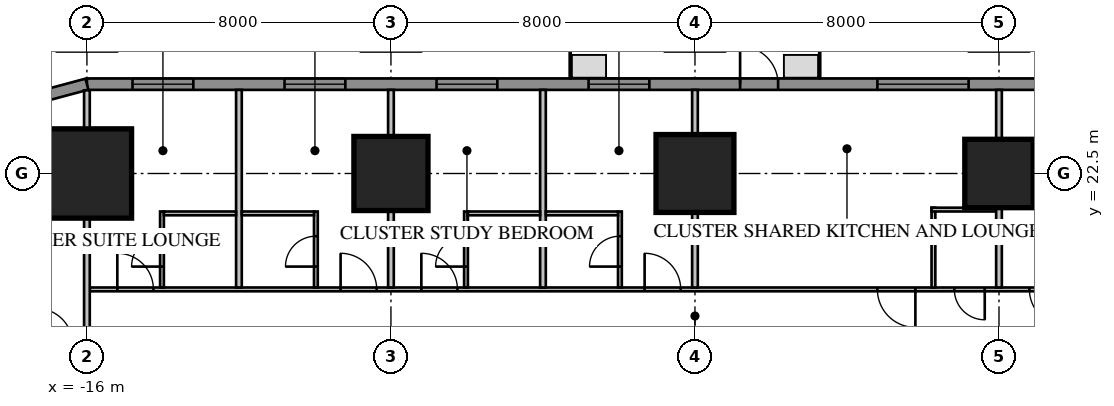
"""IFC4 building model, lengths in metres.
Left out: names, types, materials, properties, quantities, classifications, styles, units other than length and angle.
Written with IfcOpenShell. Run it as: python <this file> out.ifc"""

import sys

from ifc_helpers import new_model, si_unit, direction, frame, frame_2d, origin, origin_2d, place, context, subcontext, project, spatial, rectangle, extrude, element, fill, save


model = new_model("IFC4")
c1 = context("Model", 3, precision=1e-05, world=origin(), true_north=direction((0.0, 1.0)))
c2 = subcontext(c1, "Body", "Model", "MODEL_VIEW")
j1 = project(units=[si_unit("LENGTHUNIT", "METRE"), si_unit("PLANEANGLEUNIT", "RADIAN")], contexts=[c1])
p1 = place(None, origin())
s1 = spatial("IfcSite", under=j1, at=p1, CompositionType="ELEMENT")
p2 = place(p1, origin())
s2 = spatial("IfcBuilding", under=s1, at=p2, CompositionType="ELEMENT")
p3 = place(p2, frame((0.0, 0.0, 31.4)))
s3 = spatial("IfcBuildingStorey", under=s2, at=p3, CompositionType="ELEMENT", Elevation=31.4)
p4 = place(p3, frame((8.0, 22.5, 0.0), z_axis=(0.0, 0.0, 1.0), x_axis=(1.0, 0.0, 0.0)))
e1 = element("IfcColumn", 1, at=p4, inside=s3, PredefinedType="COLUMN", context=c2, shape_type="SweptSolid", body=[
    extrude(rectangle(XDim=1.8, YDim=1.8, at=origin_2d()), origin(), (0.0, 0.0, 1.0), 3.85),
])
p5 = place(p3, frame((0.0, 22.5, 0.0), z_axis=(0.0, 0.0, 1.0), x_axis=(1.0, 0.0, 0.0)))
e2 = element("IfcColumn", 2, at=p5, inside=s3, PredefinedType="COLUMN", context=c2, shape_type="SweptSolid", body=[
    extrude(rectangle(XDim=2.05, YDim=2.05, at=origin_2d()), origin(), (0.0, 0.0, 1.0), 3.85),
])
p6 = place(p3, frame((-8.0, 22.5, 0.0), z_axis=(0.0, 0.0, 1.0), x_axis=(1.0, 0.0, 0.0)))
e3 = element("IfcColumn", 3, at=p6, inside=s3, PredefinedType="COLUMN", context=c2, shape_type="SweptSolid", body=[
    extrude(rectangle(XDim=1.95, YDim=1.95, at=origin_2d()), origin(), (0.0, 0.0, 1.0), 3.85),
])
p7 = place(p3, frame((-16.0, 22.5, 0.0), z_axis=(0.0, 0.0, 1.0), x_axis=(1.0, 0.0, 0.0)))
e4 = element("IfcColumn", 4, at=p7, inside=s3, PredefinedType="COLUMN", context=c2, shape_type="SweptSolid", body=[
    extrude(rectangle(XDim=2.35, YDim=2.35, at=origin_2d()), origin(), (0.0, 0.0, 1.0), 3.85),
])
p8 = place(p3, frame((16.0, 24.85, 0.0), z_axis=(0.0, 0.0, 1.0), x_axis=(-1.0, 0.0, 0.0)))
e5 = element("IfcWall", 5, at=p8, inside=s3, PredefinedType="SOLIDWALL", context=c2, shape_type="SweptSolid", body=[
    extrude(rectangle(XDim=32.0, YDim=0.3, at=frame_2d((16.0, 0.0))), origin(), (0.0, 0.0, 1.0), 3.65),
])
p9 = place(p8, frame((1.2, 0.0, 0.75)))
e6 = element("IfcOpeningElement", 6, at=p9, cuts=e5, PredefinedType="OPENING", context=c2, shape_type="SweptSolid", body=[
    extrude(rectangle(XDim=1.6, YDim=1.8, at=frame_2d((0.8, 0.9))), frame((0.0, 0.17, 0.0), z_axis=(0.0, -1.0, 0.0), x_axis=(1.0, 0.0, 0.0)), (0.0, 0.0, 1.0), 0.34),
])
p10 = place(p8, frame((5.2, 0.0, 0.75)))
e7 = element("IfcOpeningElement", 7, at=p10, cuts=e5, PredefinedType="OPENING", context=c2, shape_type="SweptSolid", body=[
    extrude(rectangle(XDim=1.6, YDim=1.8, at=frame_2d((0.8, 0.9))), frame((0.0, 0.17, 0.0), z_axis=(0.0, -1.0, 0.0), x_axis=(1.0, 0.0, 0.0)), (0.0, 0.0, 1.0), 0.34),
])
p11 = place(p8, frame((17.2, 0.0, 0.75)))
e8 = element("IfcOpeningElement", 8, at=p11, cuts=e5, PredefinedType="OPENING", context=c2, shape_type="SweptSolid", body=[
    extrude(rectangle(XDim=1.6, YDim=1.8, at=frame_2d((0.8, 0.9))), frame((0.0, 0.17, 0.0), z_axis=(0.0, -1.0, 0.0), x_axis=(1.0, 0.0, 0.0)), (0.0, 0.0, 1.0), 0.34),
])
p12 = place(p8, frame((21.2, 0.0, 0.75)))
e9 = element("IfcOpeningElement", 9, at=p12, cuts=e5, PredefinedType="OPENING", context=c2, shape_type="SweptSolid", body=[
    extrude(rectangle(XDim=1.6, YDim=1.8, at=frame_2d((0.8, 0.9))), frame((0.0, 0.17, 0.0), z_axis=(0.0, -1.0, 0.0), x_axis=(1.0, 0.0, 0.0)), (0.0, 0.0, 1.0), 0.34),
])
p13 = place(p8, frame((25.2, 0.0, 0.75)))
e10 = element("IfcOpeningElement", 10, at=p13, cuts=e5, PredefinedType="OPENING", context=c2, shape_type="SweptSolid", body=[
    extrude(rectangle(XDim=1.6, YDim=1.8, at=frame_2d((0.8, 0.9))), frame((0.0, 0.17, 0.0), z_axis=(0.0, -1.0, 0.0), x_axis=(1.0, 0.0, 0.0)), (0.0, 0.0, 1.0), 0.34),
])
p14 = place(p8, frame((29.2, 0.0, 0.75)))
e11 = element("IfcOpeningElement", 11, at=p14, cuts=e5, PredefinedType="OPENING", context=c2, shape_type="SweptSolid", body=[
    extrude(rectangle(XDim=1.6, YDim=1.8, at=frame_2d((0.8, 0.9))), frame((0.0, 0.17, 0.0), z_axis=(0.0, -1.0, 0.0), x_axis=(1.0, 0.0, 0.0)), (0.0, 0.0, 1.0), 0.34),
])
p15 = place(p8, frame((8.8, 0.0, 0.75)))
e12 = element("IfcOpeningElement", 12, at=p15, cuts=e5, PredefinedType="OPENING", context=c2, shape_type="SweptSolid", body=[
    extrude(rectangle(XDim=2.4, YDim=1.8, at=frame_2d((1.2, 0.9))), frame((0.0, 0.17, 0.0), z_axis=(0.0, -1.0, 0.0), x_axis=(1.0, 0.0, 0.0)), (0.0, 0.0, 1.0), 0.34),
])
p16 = place(p8, frame((13.812, 0.0, 0.0)))
e13 = element("IfcOpeningElement", 13, at=p16, cuts=e5, PredefinedType="OPENING", context=c2, shape_type="SweptSolid", body=[
    extrude(rectangle(XDim=1.0, YDim=2.4, at=frame_2d((0.5, 1.2))), frame((0.0, 0.17, 0.0), z_axis=(0.0, -1.0, 0.0), x_axis=(1.0, 0.0, 0.0)), (0.0, 0.0, 1.0), 0.34),
])
p17 = place(p3, frame((-16.0, 24.85, 0.0), z_axis=(0.0, 0.0, 1.0), x_axis=(-0.965920218567, -0.258839972501, 0.0)))
e14 = element("IfcWall", 14, at=p17, inside=s3, PredefinedType="SOLIDWALL", context=c2, shape_type="SweptSolid", body=[
    extrude(rectangle(XDim=4.581, YDim=0.3, at=frame_2d((2.291, 0.0))), origin(), (0.0, 0.0, 1.0), 3.65),
])
p18 = place(p3, frame((15.925, 19.45, 0.0), z_axis=(0.0, 0.0, 1.0), x_axis=(-1.0, 0.0, 0.0)))
e15 = element("IfcWall", 15, at=p18, inside=s3, PredefinedType="PARTITIONING", context=c2, shape_type="SweptSolid", body=[
    extrude(rectangle(XDim=31.85, YDim=0.1, at=frame_2d((15.925, 0.0))), origin(), (0.0, 0.0, 1.0), 3.65),
])
p19 = place(p18, frame((10.125, 0.0, 0.0)))
e16 = element("IfcOpeningElement", 16, at=p19, cuts=e15, PredefinedType="OPENING", context=c2, shape_type="SweptSolid", body=[
    extrude(rectangle(XDim=1.0, YDim=2.1, at=frame_2d((0.5, 1.05))), frame((0.0, 0.07, 0.0), z_axis=(0.0, -1.0, 0.0), x_axis=(1.0, 0.0, 0.0)), (0.0, 0.0, 1.0), 0.14),
])
p20 = place(p18, frame((8.3, 0.0, 0.0)))
e17 = element("IfcOpeningElement", 17, at=p20, cuts=e15, PredefinedType="OPENING", context=c2, shape_type="SweptSolid", body=[
    extrude(rectangle(XDim=0.8, YDim=2.1, at=frame_2d((0.4, 1.05))), frame((0.0, 0.07, 0.0), z_axis=(0.0, -1.0, 0.0), x_axis=(1.0, 0.0, 0.0)), (0.0, 0.0, 1.0), 0.14),
])
p21 = place(p18, frame((0.3, 0.0, 0.0)))
e18 = element("IfcOpeningElement", 18, at=p21, cuts=e15, PredefinedType="OPENING", context=c2, shape_type="SweptSolid", body=[
    extrude(rectangle(XDim=0.95, YDim=2.1, at=frame_2d((0.475, 1.05))), frame((0.0, 0.07, 0.0), z_axis=(0.0, -1.0, 0.0), x_axis=(1.0, 0.0, 0.0)), (0.0, 0.0, 1.0), 0.14),
])
p22 = place(p18, frame((6.175, 0.0, 0.0)))
e19 = element("IfcOpeningElement", 19, at=p22, cuts=e15, PredefinedType="OPENING", context=c2, shape_type="SweptSolid", body=[
    extrude(rectangle(XDim=0.95, YDim=2.1, at=frame_2d((0.475, 1.05))), frame((0.0, 0.07, 0.0), z_axis=(0.0, -1.0, 0.0), x_axis=(1.0, 0.0, 0.0)), (0.0, 0.0, 1.0), 0.14),
])
p23 = place(p18, frame((16.3, 0.0, 0.0)))
e20 = element("IfcOpeningElement", 20, at=p23, cuts=e15, PredefinedType="OPENING", context=c2, shape_type="SweptSolid", body=[
    extrude(rectangle(XDim=0.95, YDim=2.1, at=frame_2d((0.475, 1.05))), frame((0.0, 0.07, 0.0), z_axis=(0.0, -1.0, 0.0), x_axis=(1.0, 0.0, 0.0)), (0.0, 0.0, 1.0), 0.14),
])
p24 = place(p18, frame((22.175, 0.0, 0.0)))
e21 = element("IfcOpeningElement", 21, at=p24, cuts=e15, PredefinedType="OPENING", context=c2, shape_type="SweptSolid", body=[
    extrude(rectangle(XDim=0.95, YDim=2.1, at=frame_2d((0.475, 1.05))), frame((0.0, 0.07, 0.0), z_axis=(0.0, -1.0, 0.0), x_axis=(1.0, 0.0, 0.0)), (0.0, 0.0, 1.0), 0.14),
])
p25 = place(p18, frame((24.3, 0.0, 0.0)))
e22 = element("IfcOpeningElement", 22, at=p25, cuts=e15, PredefinedType="OPENING", context=c2, shape_type="SweptSolid", body=[
    extrude(rectangle(XDim=0.95, YDim=2.1, at=frame_2d((0.475, 1.05))), frame((0.0, 0.07, 0.0), z_axis=(0.0, -1.0, 0.0), x_axis=(1.0, 0.0, 0.0)), (0.0, 0.0, 1.0), 0.14),
])
p26 = place(p18, frame((30.175, 0.0, 0.0)))
e23 = element("IfcOpeningElement", 23, at=p26, cuts=e15, PredefinedType="OPENING", context=c2, shape_type="SweptSolid", body=[
    extrude(rectangle(XDim=0.95, YDim=2.1, at=frame_2d((0.475, 1.05))), frame((0.0, 0.07, 0.0), z_axis=(0.0, -1.0, 0.0), x_axis=(1.0, 0.0, 0.0)), (0.0, 0.0, 1.0), 0.14),
])
p27 = place(p3, frame((6.275, 19.5, 0.0), z_axis=(0.0, 0.0, 1.0), x_axis=(0.0, 1.0, 0.0)))
e24 = element("IfcWall", 24, at=p27, inside=s3, PredefinedType="PARTITIONING", context=c2, shape_type="SweptSolid", body=[
    extrude(rectangle(XDim=2.1, YDim=0.1, at=frame_2d((1.05, 0.0))), origin(), (0.0, 0.0, 1.0), 3.65),
])
p28 = place(p3, frame((7.925, 21.55, 0.0), z_axis=(0.0, 0.0, 1.0), x_axis=(-1.0, 0.0, 0.0)))
e25 = element("IfcWall", 25, at=p28, inside=s3, PredefinedType="PARTITIONING", context=c2, shape_type="SweptSolid", body=[
    extrude(rectangle(XDim=1.7, YDim=0.1, at=frame_2d((0.85, 0.0))), origin(), (0.0, 0.0, 1.0), 3.65),
])
p29 = place(p3, frame((8.0, 19.5, 0.0), z_axis=(0.0, 0.0, 1.0), x_axis=(0.0, 1.0, 0.0)))
e26 = element("IfcWall", 26, at=p29, inside=s3, PredefinedType="PARTITIONING", context=c2, shape_type="SweptSolid", body=[
    extrude(rectangle(XDim=5.2, YDim=0.15, at=frame_2d((2.6, 0.0))), origin(), (0.0, 0.0, 1.0), 3.65),
])
p30 = place(p3, frame((0.0, 19.5, 0.0), z_axis=(0.0, 0.0, 1.0), x_axis=(0.0, 1.0, 0.0)))
e27 = element("IfcWall", 27, at=p30, inside=s3, PredefinedType="PARTITIONING", context=c2, shape_type="SweptSolid", body=[
    extrude(rectangle(XDim=5.2, YDim=0.15, at=frame_2d((2.6, 0.0))), origin(), (0.0, 0.0, 1.0), 2.809),
])
for number, where, z_axis, x_axis in (
    (28, (-4.0, 19.5, 0.0), (0.0, 0.0, 1.0), (0.0, 1.0, 0.0)),
    (29, (-8.0, 19.5, 0.0), (0.0, 0.0, 1.0), (0.0, 1.0, 0.0)),
    (30, (-12.0, 19.5, 0.0), (0.0, 0.0, 1.0), (0.0, 1.0, 0.0)),
):
    element("IfcWall", number, at=place(p3, frame(where, z_axis=z_axis, x_axis=x_axis)), inside=s3, PredefinedType="PARTITIONING", context=c2, shape_type="SweptSolid", body=[
        extrude(rectangle(XDim=5.2, YDim=0.15, at=frame_2d((2.6, 0.0))), origin(), (0.0, 0.0, 1.0), 3.65),
    ])
p31 = place(p3, frame((-16.0, 18.1, 0.0), z_axis=(0.0, 0.0, 1.0), x_axis=(0.0, 1.0, 0.0)))
e31 = element("IfcWall", 31, at=p31, inside=s3, PredefinedType="PARTITIONING", context=c2, shape_type="SweptSolid", body=[
    extrude(rectangle(XDim=6.589, YDim=0.15, at=frame_2d((3.295, 0.0))), origin(), (0.0, 0.0, 1.0), 3.65),
])
p32 = place(p3, frame((-1.975, 19.5, 0.0), z_axis=(0.0, 0.0, 1.0), x_axis=(0.0, 1.0, 0.0)))
e32 = element("IfcWall", 32, at=p32, inside=s3, PredefinedType="PARTITIONING", context=c2, shape_type="SweptSolid", body=[
    extrude(rectangle(XDim=2.0, YDim=0.1, at=frame_2d((1.0, 0.0))), origin(), (0.0, 0.0, 1.0), 3.65),
])
p33 = place(p32, frame((0.55, 0.0, 0.0)))
e33 = element("IfcOpeningElement", 33, at=p33, cuts=e32, PredefinedType="OPENING", context=c2, shape_type="SweptSolid", body=[
    extrude(rectangle(XDim=0.8, YDim=2.1, at=frame_2d((0.4, 1.05))), frame((0.0, 0.07, 0.0), z_axis=(0.0, -1.0, 0.0), x_axis=(1.0, 0.0, 0.0)), (0.0, 0.0, 1.0), 0.14),
])
p34 = place(p3, frame((-2.025, 21.45, 0.0), z_axis=(0.0, 0.0, 1.0), x_axis=(-1.0, 0.0, 0.0)))
e34 = element("IfcWall", 34, at=p34, inside=s3, PredefinedType="PARTITIONING", context=c2, shape_type="SweptSolid", body=[
    extrude(rectangle(XDim=1.9, YDim=0.1, at=frame_2d((0.95, 0.0))), origin(), (0.0, 0.0, 1.0), 3.65),
])
p35 = place(p3, frame((-6.025, 19.5, 0.0), z_axis=(0.0, 0.0, 1.0), x_axis=(0.0, 1.0, 0.0)))
e35 = element("IfcWall", 35, at=p35, inside=s3, PredefinedType="PARTITIONING", context=c2, shape_type="SweptSolid", body=[
    extrude(rectangle(XDim=2.0, YDim=0.1, at=frame_2d((1.0, 0.0))), origin(), (0.0, 0.0, 1.0), 3.65),
])
p36 = place(p35, frame((0.55, 0.0, 0.0)))
e36 = element("IfcOpeningElement", 36, at=p36, cuts=e35, PredefinedType="OPENING", context=c2, shape_type="SweptSolid", body=[
    extrude(rectangle(XDim=0.8, YDim=2.1, at=frame_2d((0.4, 1.05))), frame((0.0, 0.07, 0.0), z_axis=(0.0, -1.0, 0.0), x_axis=(1.0, 0.0, 0.0)), (0.0, 0.0, 1.0), 0.14),
])
p37 = place(p3, frame((-4.075, 21.45, 0.0), z_axis=(0.0, 0.0, 1.0), x_axis=(-1.0, 0.0, 0.0)))
e37 = element("IfcWall", 37, at=p37, inside=s3, PredefinedType="PARTITIONING", context=c2, shape_type="SweptSolid", body=[
    extrude(rectangle(XDim=1.9, YDim=0.1, at=frame_2d((0.95, 0.0))), origin(), (0.0, 0.0, 1.0), 3.65),
])
p38 = place(p3, frame((-9.975, 19.5, 0.0), z_axis=(0.0, 0.0, 1.0), x_axis=(0.0, 1.0, 0.0)))
e38 = element("IfcWall", 38, at=p38, inside=s3, PredefinedType="PARTITIONING", context=c2, shape_type="SweptSolid", body=[
    extrude(rectangle(XDim=2.0, YDim=0.1, at=frame_2d((1.0, 0.0))), origin(), (0.0, 0.0, 1.0), 3.65),
])
p39 = place(p38, frame((0.55, 0.0, 0.0)))
e39 = element("IfcOpeningElement", 39, at=p39, cuts=e38, PredefinedType="OPENING", context=c2, shape_type="SweptSolid", body=[
    extrude(rectangle(XDim=0.8, YDim=2.1, at=frame_2d((0.4, 1.05))), frame((0.0, 0.07, 0.0), z_axis=(0.0, -1.0, 0.0), x_axis=(1.0, 0.0, 0.0)), (0.0, 0.0, 1.0), 0.14),
])
p40 = place(p3, frame((-10.025, 21.45, 0.0), z_axis=(0.0, 0.0, 1.0), x_axis=(-1.0, 0.0, 0.0)))
e40 = element("IfcWall", 40, at=p40, inside=s3, PredefinedType="PARTITIONING", context=c2, shape_type="SweptSolid", body=[
    extrude(rectangle(XDim=1.9, YDim=0.1, at=frame_2d((0.95, 0.0))), origin(), (0.0, 0.0, 1.0), 3.65),
])
p41 = place(p3, frame((-14.025, 19.5, 0.0), z_axis=(0.0, 0.0, 1.0), x_axis=(0.0, 1.0, 0.0)))
e41 = element("IfcWall", 41, at=p41, inside=s3, PredefinedType="PARTITIONING", context=c2, shape_type="SweptSolid", body=[
    extrude(rectangle(XDim=2.0, YDim=0.1, at=frame_2d((1.0, 0.0))), origin(), (0.0, 0.0, 1.0), 3.65),
])
p42 = place(p41, frame((0.55, 0.0, 0.0)))
e42 = element("IfcOpeningElement", 42, at=p42, cuts=e41, PredefinedType="OPENING", context=c2, shape_type="SweptSolid", body=[
    extrude(rectangle(XDim=0.8, YDim=2.1, at=frame_2d((0.4, 1.05))), frame((0.0, 0.07, 0.0), z_axis=(0.0, -1.0, 0.0), x_axis=(1.0, 0.0, 0.0)), (0.0, 0.0, 1.0), 0.14),
])
p43 = place(p3, frame((-12.075, 21.45, 0.0), z_axis=(0.0, 0.0, 1.0), x_axis=(-1.0, 0.0, 0.0)))
e43 = element("IfcWall", 43, at=p43, inside=s3, PredefinedType="PARTITIONING", context=c2, shape_type="SweptSolid", body=[
    extrude(rectangle(XDim=1.9, YDim=0.1, at=frame_2d((0.95, 0.0))), origin(), (0.0, 0.0, 1.0), 3.65),
])
p44 = place(p11, origin())
e44 = element("IfcWindow", 44, at=p44, inside=s3, PartitioningType="SINGLE_PANEL", PredefinedType="WINDOW", context=c2, shape_type="SweptSolid", body=[
    extrude(rectangle(XDim=1.6, YDim=1.8, at=frame_2d((0.8, 0.9))), frame((0.0, 0.03, 0.0), z_axis=(0.0, -1.0, 0.0), x_axis=(1.0, 0.0, 0.0)), (0.0, 0.0, 1.0), 0.06),
])
fill(e8, e44)
p45 = place(p12, origin())
e45 = element("IfcWindow", 45, at=p45, inside=s3, PartitioningType="SINGLE_PANEL", PredefinedType="WINDOW", context=c2, shape_type="SweptSolid", body=[
    extrude(rectangle(XDim=1.6, YDim=1.8, at=frame_2d((0.8, 0.9))), frame((0.0, 0.03, 0.0), z_axis=(0.0, -1.0, 0.0), x_axis=(1.0, 0.0, 0.0)), (0.0, 0.0, 1.0), 0.06),
])
fill(e9, e45)
p46 = place(p13, origin())
e46 = element("IfcWindow", 46, at=p46, inside=s3, PartitioningType="SINGLE_PANEL", PredefinedType="WINDOW", context=c2, shape_type="SweptSolid", body=[
    extrude(rectangle(XDim=1.6, YDim=1.8, at=frame_2d((0.8, 0.9))), frame((0.0, 0.03, 0.0), z_axis=(0.0, -1.0, 0.0), x_axis=(1.0, 0.0, 0.0)), (0.0, 0.0, 1.0), 0.06),
])
fill(e10, e46)
p47 = place(p14, origin())
e47 = element("IfcWindow", 47, at=p47, inside=s3, PartitioningType="SINGLE_PANEL", PredefinedType="WINDOW", context=c2, shape_type="SweptSolid", body=[
    extrude(rectangle(XDim=1.6, YDim=1.8, at=frame_2d((0.8, 0.9))), frame((0.0, 0.03, 0.0), z_axis=(0.0, -1.0, 0.0), x_axis=(1.0, 0.0, 0.0)), (0.0, 0.0, 1.0), 0.06),
])
fill(e11, e47)
p48 = place(p15, origin())
e48 = element("IfcWindow", 48, at=p48, inside=s3, PartitioningType="SINGLE_PANEL", PredefinedType="WINDOW", context=c2, shape_type="SweptSolid", body=[
    extrude(rectangle(XDim=2.4, YDim=1.8, at=frame_2d((1.2, 0.9))), frame((0.0, 0.03, 0.0), z_axis=(0.0, -1.0, 0.0), x_axis=(1.0, 0.0, 0.0)), (0.0, 0.0, 1.0), 0.06),
])
fill(e12, e48)
p49 = place(p16, origin())
e49 = element("IfcDoor", 49, at=p49, inside=s3, OperationType="SINGLE_SWING_RIGHT", PredefinedType="DOOR", context=c2, shape_type="SweptSolid", body=[
    extrude(rectangle(XDim=1.0, YDim=2.4, at=frame_2d((0.5, 1.2))), frame((0.0, 0.025, 0.0), z_axis=(0.0, -1.0, 0.0), x_axis=(1.0, 0.0, 0.0)), (0.0, 0.0, 1.0), 0.05),
])
fill(e13, e49)
p50 = place(p19, origin())
e50 = element("IfcDoor", 50, at=p50, inside=s3, OperationType="SINGLE_SWING_LEFT", PredefinedType="DOOR", context=c2, shape_type="SweptSolid", body=[
    extrude(rectangle(XDim=1.0, YDim=2.1, at=frame_2d((0.5, 1.05))), frame((0.0, 0.025, 0.0), z_axis=(0.0, -1.0, 0.0), x_axis=(1.0, 0.0, 0.0)), (0.0, 0.0, 1.0), 0.05),
])
fill(e16, e50)
p51 = place(p20, origin())
e51 = element("IfcDoor", 51, at=p51, inside=s3, OperationType="SINGLE_SWING_LEFT", PredefinedType="DOOR", context=c2, shape_type="SweptSolid", body=[
    extrude(rectangle(XDim=0.8, YDim=2.1, at=frame_2d((0.4, 1.05))), frame((0.0, 0.025, 0.0), z_axis=(0.0, -1.0, 0.0), x_axis=(1.0, 0.0, 0.0)), (0.0, 0.0, 1.0), 0.05),
])
fill(e17, e51)
p52 = place(p22, origin())
e52 = element("IfcDoor", 52, at=p52, inside=s3, OperationType="SINGLE_SWING_LEFT", PredefinedType="DOOR", context=c2, shape_type="SweptSolid", body=[
    extrude(rectangle(XDim=0.95, YDim=2.1, at=frame_2d((0.475, 1.05))), frame((0.0, 0.025, 0.0), z_axis=(0.0, -1.0, 0.0), x_axis=(1.0, 0.0, 0.0)), (0.0, 0.0, 1.0), 0.05),
])
fill(e19, e52)
p53 = place(p23, origin())
e53 = element("IfcDoor", 53, at=p53, inside=s3, OperationType="SINGLE_SWING_RIGHT", PredefinedType="DOOR", context=c2, shape_type="SweptSolid", body=[
    extrude(rectangle(XDim=0.95, YDim=2.1, at=frame_2d((0.475, 1.05))), frame((0.0, 0.025, 0.0), z_axis=(0.0, -1.0, 0.0), x_axis=(1.0, 0.0, 0.0)), (0.0, 0.0, 1.0), 0.05),
])
fill(e20, e53)
p54 = place(p33, origin())
e54 = element("IfcDoor", 54, at=p54, inside=s3, OperationType="SINGLE_SWING_LEFT", PredefinedType="DOOR", context=c2, shape_type="SweptSolid", body=[
    extrude(rectangle(XDim=0.8, YDim=2.1, at=frame_2d((0.4, 1.05))), frame((0.0, 0.025, 0.0), z_axis=(0.0, -1.0, 0.0), x_axis=(1.0, 0.0, 0.0)), (0.0, 0.0, 1.0), 0.05),
])
fill(e33, e54)
p55 = place(p24, origin())
e55 = element("IfcDoor", 55, at=p55, inside=s3, OperationType="SINGLE_SWING_RIGHT", PredefinedType="DOOR", context=c2, shape_type="SweptSolid", body=[
    extrude(rectangle(XDim=0.95, YDim=2.1, at=frame_2d((0.475, 1.05))), frame((0.0, 0.025, 0.0), z_axis=(0.0, -1.0, 0.0), x_axis=(1.0, 0.0, 0.0)), (0.0, 0.0, 1.0), 0.05),
])
fill(e21, e55)
p56 = place(p36, origin())
e56 = element("IfcDoor", 56, at=p56, inside=s3, OperationType="SINGLE_SWING_LEFT", PredefinedType="DOOR", context=c2, shape_type="SweptSolid", body=[
    extrude(rectangle(XDim=0.8, YDim=2.1, at=frame_2d((0.4, 1.05))), frame((0.0, 0.025, 0.0), z_axis=(0.0, -1.0, 0.0), x_axis=(1.0, 0.0, 0.0)), (0.0, 0.0, 1.0), 0.05),
])
fill(e36, e56)
p57 = place(p25, origin())
e57 = element("IfcDoor", 57, at=p57, inside=s3, OperationType="SINGLE_SWING_RIGHT", PredefinedType="DOOR", context=c2, shape_type="SweptSolid", body=[
    extrude(rectangle(XDim=0.95, YDim=2.1, at=frame_2d((0.475, 1.05))), frame((0.0, 0.025, 0.0), z_axis=(0.0, -1.0, 0.0), x_axis=(1.0, 0.0, 0.0)), (0.0, 0.0, 1.0), 0.05),
])
fill(e22, e57)
p58 = place(p39, origin())
e58 = element("IfcDoor", 58, at=p58, inside=s3, OperationType="SINGLE_SWING_LEFT", PredefinedType="DOOR", context=c2, shape_type="SweptSolid", body=[
    extrude(rectangle(XDim=0.8, YDim=2.1, at=frame_2d((0.4, 1.05))), frame((0.0, 0.025, 0.0), z_axis=(0.0, -1.0, 0.0), x_axis=(1.0, 0.0, 0.0)), (0.0, 0.0, 1.0), 0.05),
])
fill(e39, e58)
p59 = place(p26, origin())
e59 = element("IfcDoor", 59, at=p59, inside=s3, OperationType="SINGLE_SWING_RIGHT", PredefinedType="DOOR", context=c2, shape_type="SweptSolid", body=[
    extrude(rectangle(XDim=0.95, YDim=2.1, at=frame_2d((0.475, 1.05))), frame((0.0, 0.025, 0.0), z_axis=(0.0, -1.0, 0.0), x_axis=(1.0, 0.0, 0.0)), (0.0, 0.0, 1.0), 0.05),
])
fill(e23, e59)
p60 = place(p42, origin())
e60 = element("IfcDoor", 60, at=p60, inside=s3, OperationType="SINGLE_SWING_LEFT", PredefinedType="DOOR", context=c2, shape_type="SweptSolid", body=[
    extrude(rectangle(XDim=0.8, YDim=2.1, at=frame_2d((0.4, 1.05))), frame((0.0, 0.025, 0.0), z_axis=(0.0, -1.0, 0.0), x_axis=(1.0, 0.0, 0.0)), (0.0, 0.0, 1.0), 0.05),
])
fill(e42, e60)
save(model, sys.argv[1])
